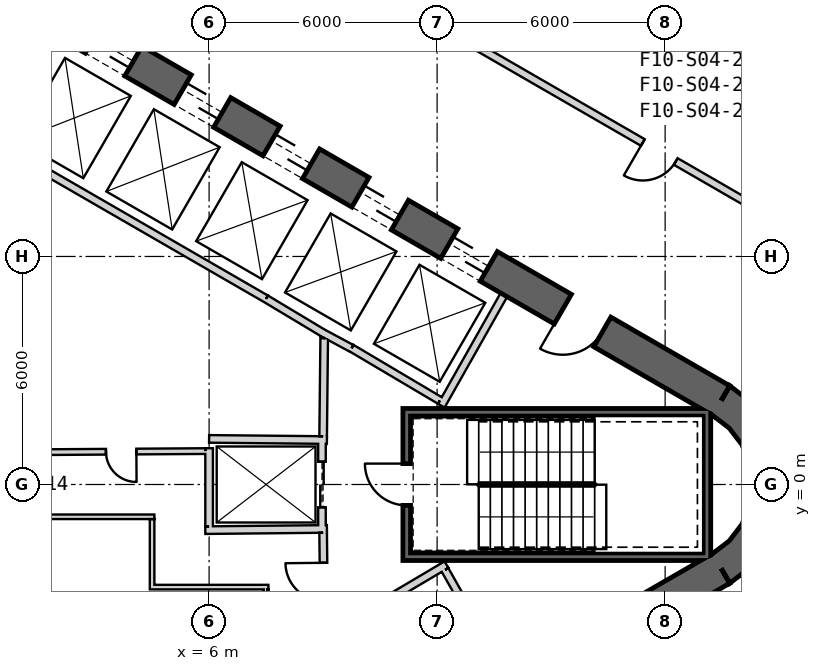
"""IFC4 building model, lengths in metres.
Left out: names, types, materials, properties, quantities, classifications, styles, units other than length and angle.
Written with IfcOpenShell. Run it as: python <this file> out.ifc"""

import sys

from ifc_helpers import new_model, si_unit, direction, frame, frame_2d, origin, place, context, subcontext, project, spatial, polyline, rectangle, outline, extrude, element, fill, save


model = new_model("IFC4")
c1 = context("Model", 3, precision=1e-05, world=origin(), true_north=direction((0.0, 1.0)))
c2 = subcontext(c1, "Body", "Model", "MODEL_VIEW")
j1 = project(units=[si_unit("LENGTHUNIT", "METRE"), si_unit("PLANEANGLEUNIT", "RADIAN")], contexts=[c1])
p1 = place(None, origin())
s1 = spatial("IfcSite", under=j1, at=p1, CompositionType="ELEMENT")
p2 = place(p1, origin())
s2 = spatial("IfcBuilding", under=s1, at=p2, CompositionType="ELEMENT")
p3 = place(p2, frame((0.0, 0.0, 94.7)))
s3 = spatial("IfcBuildingStorey", under=s2, at=p3, CompositionType="ELEMENT", Elevation=94.7)
p4 = place(p3, frame((19.475, 2.208, 0.0), z_axis=(0.0, 0.0, 1.0), x_axis=(-0.866028369851, 0.499994862586, 0.0)))
e1 = element("IfcWall", 1, at=p4, inside=s3, PredefinedType="SHEAR", context=c2, shape_type="SweptSolid", body=[
    extrude(rectangle(XDim=31.523, YDim=0.9, at=frame_2d((15.762, 0.0))), origin(), (0.0, 0.0, 1.0), 4.1),
])
p5 = place(p4, frame((7.062, 0.0, 0.0)))
e2 = element("IfcOpeningElement", 2, at=p5, cuts=e1, PredefinedType="OPENING", context=c2, shape_type="SweptSolid", body=[
    extrude(rectangle(XDim=1.2, YDim=2.4, at=frame_2d((0.6, 1.2))), frame((0.0, 0.46, 0.0), z_axis=(0.0, -1.0, 0.0), x_axis=(1.0, 0.0, 0.0)), (0.0, 0.0, 1.0), 0.92),
])
p6 = place(p4, frame((9.762, 0.0, 0.0)))
e3 = element("IfcOpeningElement", 3, at=p6, cuts=e1, PredefinedType="OPENING", context=c2, shape_type="SweptSolid", body=[
    extrude(rectangle(XDim=1.2, YDim=2.4, at=frame_2d((0.6, 1.2))), frame((0.0, 0.46, 0.0), z_axis=(0.0, -1.0, 0.0), x_axis=(1.0, 0.0, 0.0)), (0.0, 0.0, 1.0), 0.92),
])
p7 = place(p4, frame((12.462, 0.0, 0.0)))
e4 = element("IfcOpeningElement", 4, at=p7, cuts=e1, PredefinedType="OPENING", context=c2, shape_type="SweptSolid", body=[
    extrude(rectangle(XDim=1.2, YDim=2.4, at=frame_2d((0.6, 1.2))), frame((0.0, 0.46, 0.0), z_axis=(0.0, -1.0, 0.0), x_axis=(1.0, 0.0, 0.0)), (0.0, 0.0, 1.0), 0.92),
])
p8 = place(p4, frame((15.162, 0.0, 0.0)))
e5 = element("IfcOpeningElement", 5, at=p8, cuts=e1, PredefinedType="OPENING", context=c2, shape_type="SweptSolid", body=[
    extrude(rectangle(XDim=1.2, YDim=2.4, at=frame_2d((0.6, 1.2))), frame((0.0, 0.46, 0.0), z_axis=(0.0, -1.0, 0.0), x_axis=(1.0, 0.0, 0.0)), (0.0, 0.0, 1.0), 0.92),
])
p9 = place(p4, frame((17.862, 0.0, 0.0)))
e6 = element("IfcOpeningElement", 6, at=p9, cuts=e1, PredefinedType="OPENING", context=c2, shape_type="SweptSolid", body=[
    extrude(rectangle(XDim=1.2, YDim=2.4, at=frame_2d((0.6, 1.2))), frame((0.0, 0.46, 0.0), z_axis=(0.0, -1.0, 0.0), x_axis=(1.0, 0.0, 0.0)), (0.0, 0.0, 1.0), 0.92),
])
p10 = place(p4, frame((20.562, 0.0, 0.0)))
e7 = element("IfcOpeningElement", 7, at=p10, cuts=e1, PredefinedType="OPENING", context=c2, shape_type="SweptSolid", body=[
    extrude(rectangle(XDim=1.2, YDim=2.4, at=frame_2d((0.6, 1.2))), frame((0.0, 0.46, 0.0), z_axis=(0.0, -1.0, 0.0), x_axis=(1.0, 0.0, 0.0)), (0.0, 0.0, 1.0), 0.92),
])
p11 = place(p4, frame((23.262, 0.0, 0.0)))
e8 = element("IfcOpeningElement", 8, at=p11, cuts=e1, PredefinedType="OPENING", context=c2, shape_type="SweptSolid", body=[
    extrude(rectangle(XDim=1.2, YDim=2.4, at=frame_2d((0.6, 1.2))), frame((0.0, 0.46, 0.0), z_axis=(0.0, -1.0, 0.0), x_axis=(1.0, 0.0, 0.0)), (0.0, 0.0, 1.0), 0.92),
])
p12 = place(p4, frame((3.612, 0.0, 0.0)))
e9 = element("IfcOpeningElement", 9, at=p12, cuts=e1, PredefinedType="OPENING", context=c2, shape_type="SweptSolid", body=[
    extrude(rectangle(XDim=1.2, YDim=2.4, at=frame_2d((0.6, 1.2))), frame((0.0, 0.46, 0.0), z_axis=(0.0, -1.0, 0.0), x_axis=(1.0, 0.0, 0.0)), (0.0, 0.0, 1.0), 0.92),
])
p13 = place(p4, frame((26.712, 0.0, 0.0)))
e10 = element("IfcOpeningElement", 10, at=p13, cuts=e1, PredefinedType="OPENING", context=c2, shape_type="SweptSolid", body=[
    extrude(rectangle(XDim=1.2, YDim=2.4, at=frame_2d((0.6, 1.2))), frame((0.0, 0.46, 0.0), z_axis=(0.0, -1.0, 0.0), x_axis=(1.0, 0.0, 0.0)), (0.0, 0.0, 1.0), 0.92),
])
p14 = place(p3, frame((-7.825, -17.97, 0.0), z_axis=(0.0, 0.0, 1.0), x_axis=(0.866028369851, 0.499994862586, 0.0)))
e11 = element("IfcWall", 11, at=p14, inside=s3, PredefinedType="SHEAR", context=c2, shape_type="SweptSolid", body=[
    extrude(rectangle(XDim=31.523, YDim=0.9, at=frame_2d((15.762, 0.0))), origin(), (0.0, 0.0, 1.0), 4.1),
])
p15 = place(p14, frame((7.062, 0.0, 0.0)))
e12 = element("IfcOpeningElement", 12, at=p15, cuts=e11, PredefinedType="OPENING", context=c2, shape_type="SweptSolid", body=[
    extrude(rectangle(XDim=1.2, YDim=2.4, at=frame_2d((0.6, 1.2))), frame((0.0, 0.46, 0.0), z_axis=(0.0, -1.0, 0.0), x_axis=(1.0, 0.0, 0.0)), (0.0, 0.0, 1.0), 0.92),
])
p16 = place(p14, frame((9.762, 0.0, 0.0)))
e13 = element("IfcOpeningElement", 13, at=p16, cuts=e11, PredefinedType="OPENING", context=c2, shape_type="SweptSolid", body=[
    extrude(rectangle(XDim=1.2, YDim=2.4, at=frame_2d((0.6, 1.2))), frame((0.0, 0.46, 0.0), z_axis=(0.0, -1.0, 0.0), x_axis=(1.0, 0.0, 0.0)), (0.0, 0.0, 1.0), 0.92),
])
p17 = place(p14, frame((12.462, 0.0, 0.0)))
e14 = element("IfcOpeningElement", 14, at=p17, cuts=e11, PredefinedType="OPENING", context=c2, shape_type="SweptSolid", body=[
    extrude(rectangle(XDim=1.2, YDim=2.4, at=frame_2d((0.6, 1.2))), frame((0.0, 0.46, 0.0), z_axis=(0.0, -1.0, 0.0), x_axis=(1.0, 0.0, 0.0)), (0.0, 0.0, 1.0), 0.92),
])
p18 = place(p14, frame((15.162, 0.0, 0.0)))
e15 = element("IfcOpeningElement", 15, at=p18, cuts=e11, PredefinedType="OPENING", context=c2, shape_type="SweptSolid", body=[
    extrude(rectangle(XDim=1.2, YDim=2.4, at=frame_2d((0.6, 1.2))), frame((0.0, 0.46, 0.0), z_axis=(0.0, -1.0, 0.0), x_axis=(1.0, 0.0, 0.0)), (0.0, 0.0, 1.0), 0.92),
])
p19 = place(p14, frame((17.862, 0.0, 0.0)))
e16 = element("IfcOpeningElement", 16, at=p19, cuts=e11, PredefinedType="OPENING", context=c2, shape_type="SweptSolid", body=[
    extrude(rectangle(XDim=1.2, YDim=2.4, at=frame_2d((0.6, 1.2))), frame((0.0, 0.46, 0.0), z_axis=(0.0, -1.0, 0.0), x_axis=(1.0, 0.0, 0.0)), (0.0, 0.0, 1.0), 0.92),
])
p20 = place(p14, frame((20.562, 0.0, 0.0)))
e17 = element("IfcOpeningElement", 17, at=p20, cuts=e11, PredefinedType="OPENING", context=c2, shape_type="SweptSolid", body=[
    extrude(rectangle(XDim=1.2, YDim=2.4, at=frame_2d((0.6, 1.2))), frame((0.0, 0.46, 0.0), z_axis=(0.0, -1.0, 0.0), x_axis=(1.0, 0.0, 0.0)), (0.0, 0.0, 1.0), 0.92),
])
p21 = place(p14, frame((26.712, 0.0, 0.0)))
e18 = element("IfcOpeningElement", 18, at=p21, cuts=e11, PredefinedType="OPENING", context=c2, shape_type="SweptSolid", body=[
    extrude(rectangle(XDim=1.2, YDim=2.4, at=frame_2d((0.6, 1.2))), frame((0.0, 0.46, 0.0), z_axis=(0.0, -1.0, 0.0), x_axis=(1.0, 0.0, 0.0)), (0.0, 0.0, 1.0), 0.92),
])
p22 = place(p14, frame((3.612, 0.0, 0.0)))
e19 = element("IfcOpeningElement", 19, at=p22, cuts=e11, PredefinedType="OPENING", context=c2, shape_type="SweptSolid", body=[
    extrude(rectangle(XDim=1.2, YDim=2.4, at=frame_2d((0.6, 1.2))), frame((0.0, 0.46, 0.0), z_axis=(0.0, -1.0, 0.0), x_axis=(1.0, 0.0, 0.0)), (0.0, 0.0, 1.0), 0.92),
])
p23 = place(p3, origin())
e20 = element("IfcWall", 20, at=p23, inside=s3, PredefinedType="SHEAR", context=c2, shape_type="SweptSolid", body=[
    extrude(outline(polyline([(19.7, -2.598), (20.321, -2.121), (20.798, -1.5), (21.098, -0.777), (21.2, 0.0), (21.098, 0.777), (20.798, 1.5), (20.321, 2.121), (19.7, 2.598), (19.25, 1.819), (19.685, 1.485), (20.019, 1.05), (20.229, 0.543), (20.3, 0.0), (20.229, -0.543), (20.019, -1.05), (19.685, -1.485), (19.25, -1.819), (19.7, -2.598)])), origin(), (0.0, 0.0, 1.0), 4.1),
])
p24 = place(p3, frame((7.497, 4.886, 0.0), z_axis=(0.0, 0.0, 1.0), x_axis=(-0.866030989016, 0.499990325971, 0.0)))
e21 = element("IfcWall", 21, at=p24, inside=s3, PredefinedType="PLUMBINGWALL", context=c2, shape_type="SweptSolid", body=[
    extrude(rectangle(XDim=8.1, YDim=0.2, at=frame_2d((4.05, 0.0))), origin(), (0.0, 0.0, 1.0), 3.8),
])
p25 = place(p3, frame((12.11, 2.073, 0.0), z_axis=(0.0, 0.0, 1.0), x_axis=(0.49196600604, 0.870614408852, 0.0)))
e22 = element("IfcWall", 22, at=p25, inside=s3, PredefinedType="PLUMBINGWALL", context=c2, shape_type="SweptSolid", body=[
    extrude(rectangle(XDim=3.35, YDim=0.2, at=frame_2d((1.675, 0.0))), origin(), (0.0, 0.0, 1.0), 3.8),
])
p26 = place(p3, frame((12.073, 2.211, 0.0), z_axis=(0.0, 0.0, 1.0), x_axis=(-0.860438357912, 0.509554542943, 0.0)))
e23 = element("IfcWall", 23, at=p26, inside=s3, PredefinedType="PLUMBINGWALL", context=c2, shape_type="SweptSolid", body=[
    extrude(rectangle(XDim=2.7, YDim=0.2, at=frame_2d((1.35, 0.0))), origin(), (0.0, 0.0, 1.0), 3.8),
])
p27 = place(p3, frame((9.748, 3.583, 0.0), z_axis=(0.0, 0.0, 1.0), x_axis=(-0.880917147855, 0.473270513147, 0.0)))
e24 = element("IfcWall", 24, at=p27, inside=s3, PredefinedType="PLUMBINGWALL", context=c2, shape_type="SweptSolid", body=[
    extrude(rectangle(XDim=0.878, YDim=0.2, at=frame_2d((0.439, 0.0))), origin(), (0.0, 0.0, 1.0), 3.8),
])
p28 = place(p3, frame((9.079, 3.937, 0.0), z_axis=(0.0, 0.0, 1.0), x_axis=(-0.857516281273, 0.51445682749, 0.0)))
e25 = element("IfcWall", 25, at=p28, inside=s3, PredefinedType="PLUMBINGWALL", context=c2, shape_type="SweptSolid", body=[
    extrude(rectangle(XDim=1.845, YDim=0.2, at=frame_2d((0.922, 0.0))), origin(), (0.0, 0.0, 1.0), 3.8),
])
p29 = place(p3, frame((19.2, 1.9, -0.3), z_axis=(0.0, 0.0, 1.0), x_axis=(-1.0, 0.0, 0.0)))
e26 = element("IfcWall", 26, at=p29, inside=s3, PredefinedType="SHEAR", context=c2, shape_type="SweptSolid", body=[
    extrude(rectangle(XDim=8.1, YDim=0.2, at=frame_2d((4.05, 0.0))), origin(), (0.0, 0.0, 1.0), 4.1),
])
p30 = place(p3, frame((19.1, -2.0, -0.3), z_axis=(0.0, 0.0, 1.0), x_axis=(0.0, 1.0, 0.0)))
e27 = element("IfcWall", 27, at=p30, inside=s3, PredefinedType="SHEAR", context=c2, shape_type="SweptSolid", body=[
    extrude(rectangle(XDim=3.8, YDim=0.2, at=frame_2d((1.9, 0.0))), origin(), (0.0, 0.0, 1.0), 4.1),
])
p31 = place(p3, frame((11.1, -1.9, -0.3), z_axis=(0.0, 0.0, 1.0), x_axis=(1.0, 0.0, 0.0)))
e28 = element("IfcWall", 28, at=p31, inside=s3, PredefinedType="SHEAR", context=c2, shape_type="SweptSolid", body=[
    extrude(rectangle(XDim=7.9, YDim=0.2, at=frame_2d((3.95, 0.0))), origin(), (0.0, 0.0, 1.0), 4.1),
])
p32 = place(p3, frame((11.2, -1.8, -0.3), z_axis=(0.0, 0.0, 1.0), x_axis=(0.0, 1.0, 0.0)))
e29 = element("IfcWall", 29, at=p32, inside=s3, PredefinedType="SHEAR", context=c2, shape_type="SweptSolid", body=[
    extrude(rectangle(XDim=3.6, YDim=0.2, at=frame_2d((1.8, 0.0))), origin(), (0.0, 0.0, 1.0), 4.1),
])
p33 = place(p32, frame((1.25, 0.0, 0.3)))
e30 = element("IfcOpeningElement", 30, at=p33, cuts=e29, PredefinedType="OPENING", context=c2, shape_type="SweptSolid", body=[
    extrude(rectangle(XDim=1.1, YDim=2.1, at=frame_2d((0.55, 1.05))), frame((0.0, 0.11, 0.0), z_axis=(0.0, -1.0, 0.0), x_axis=(1.0, 0.0, 0.0)), (0.0, 0.0, 1.0), 0.22),
])
p34 = place(p3, frame((8.97, 1.2, 0.0), z_axis=(0.0, 0.0, 1.0), x_axis=(0.0, -1.0, 0.0)))
e31 = element("IfcWall", 31, at=p34, inside=s3, PredefinedType="PLUMBINGWALL", context=c2, shape_type="SweptSolid", body=[
    extrude(rectangle(XDim=2.4, YDim=0.2, at=frame_2d((1.2, 0.0))), origin(), (0.0, 0.0, 1.0), 3.8),
])
p35 = place(p34, frame((0.6, 0.0, 0.0)))
e32 = element("IfcOpeningElement", 32, at=p35, cuts=e31, PredefinedType="OPENING", context=c2, shape_type="SweptSolid", body=[
    extrude(rectangle(XDim=1.2, YDim=2.4, at=frame_2d((0.6, 1.2))), frame((0.0, 0.11, 0.0), z_axis=(0.0, -1.0, 0.0), x_axis=(1.0, 0.0, 0.0)), (0.0, 0.0, 1.0), 0.22),
])
p36 = place(p3, frame((6.0, 1.2, 0.0), z_axis=(0.0, 0.0, 1.0), x_axis=(0.999949988, -0.010001074852, 0.0)))
e33 = element("IfcWall", 33, at=p36, inside=s3, PredefinedType="PLUMBINGWALL", context=c2, shape_type="SweptSolid", body=[
    extrude(rectangle(XDim=3.1, YDim=0.2, at=frame_2d((1.55, 0.0))), origin(), (0.0, 0.0, 1.0), 3.8),
])
p37 = place(p3, frame((5.9, -1.201, 0.0), z_axis=(0.0, 0.0, 1.0), x_axis=(0.999950064753, 0.009993397809, 0.0)))
e34 = element("IfcWall", 34, at=p37, inside=s3, PredefinedType="PLUMBINGWALL", context=c2, shape_type="SweptSolid", body=[
    extrude(rectangle(XDim=3.2, YDim=0.2, at=frame_2d((1.6, 0.0))), origin(), (0.0, 0.0, 1.0), 3.8),
])
p38 = place(p3, frame((6.0, -1.1, 0.0), z_axis=(0.0, 0.0, 1.0), x_axis=(0.0, 1.0, 0.0)))
e35 = element("IfcWall", 35, at=p38, inside=s3, PredefinedType="PLUMBINGWALL", context=c2, shape_type="SweptSolid", body=[
    extrude(rectangle(XDim=2.055, YDim=0.2, at=frame_2d((1.027, 0.0))), origin(), (0.0, 0.0, 1.0), 3.8),
])
p39 = place(p3, frame((12.245, -2.109, 0.0), z_axis=(0.0, 0.0, 1.0), x_axis=(-0.860414880418, -0.509594185166, 0.0)))
e36 = element("IfcWall", 36, at=p39, inside=s3, PredefinedType="PARTITIONING", context=c2, shape_type="SweptSolid", body=[
    extrude(rectangle(XDim=2.7, YDim=0.2, at=frame_2d((1.35, 0.0))), origin(), (0.0, 0.0, 1.0), 3.8),
])
p40 = place(p3, frame((13.758, -4.99, 0.0), z_axis=(0.0, 0.0, 1.0), x_axis=(-0.491993409184, 0.87059892334, 0.0)))
e37 = element("IfcWall", 37, at=p40, inside=s3, PredefinedType="PARTITIONING", context=c2, shape_type="SweptSolid", body=[
    extrude(rectangle(XDim=3.15, YDim=0.2, at=frame_2d((1.575, 0.0))), origin(), (0.0, 0.0, 1.0), 3.8),
])
p41 = place(p40, frame((1.175, 0.0, 0.0)))
e38 = element("IfcOpeningElement", 38, at=p41, cuts=e37, PredefinedType="OPENING", context=c2, shape_type="SweptSolid", body=[
    extrude(rectangle(XDim=0.8, YDim=2.1, at=frame_2d((0.4, 1.05))), frame((0.0, 0.11, 0.0), z_axis=(0.0, -1.0, 0.0), x_axis=(1.0, 0.0, 0.0)), (0.0, 0.0, 1.0), 0.22),
])
p42 = place(p3, frame((9.001, 1.27, 0.0), z_axis=(0.0, 0.0, 1.0), x_axis=(0.010784614026, 0.999941844359, 0.0)))
e39 = element("IfcWall", 39, at=p42, inside=s3, PredefinedType="PARTITIONING", context=c2, shape_type="SweptSolid", body=[
    extrude(rectangle(XDim=2.581, YDim=0.2, at=frame_2d((1.291, 0.0))), origin(), (0.0, 0.0, 1.0), 3.8),
])
p43 = place(p3, frame((9.029, -3.851, 0.0), z_axis=(0.0, 0.0, 1.0), x_axis=(-0.010783593937, 0.99994185536, 0.0)))
e40 = element("IfcWall", 40, at=p43, inside=s3, PredefinedType="PARTITIONING", context=c2, shape_type="SweptSolid", body=[
    extrude(rectangle(XDim=2.581, YDim=0.2, at=frame_2d((1.291, 0.0))), origin(), (0.0, 0.0, 1.0), 3.8),
])
p44 = place(p43, frame((0.791, 0.0, 0.0)))
e41 = element("IfcOpeningElement", 41, at=p44, cuts=e40, PredefinedType="OPENING", context=c2, shape_type="SweptSolid", body=[
    extrude(rectangle(XDim=1.0, YDim=2.1, at=frame_2d((0.5, 1.05))), frame((0.0, 0.11, 0.0), z_axis=(0.0, -1.0, 0.0), x_axis=(1.0, 0.0, 0.0)), (0.0, 0.0, 1.0), 0.22),
])
p45 = place(p3, frame((1.344, 0.849, 0.0), z_axis=(0.0, 0.0, 1.0), x_axis=(0.999978627641, 0.00653790957, 0.0)))
e42 = element("IfcWall", 42, at=p45, inside=s3, PredefinedType="PLUMBINGWALL", context=c2, shape_type="SweptSolid", body=[
    extrude(rectangle(XDim=4.556, YDim=0.15, at=frame_2d((2.278, 0.0))), origin(), (0.0, 0.0, 1.0), 3.8),
])
p46 = place(p45, frame((1.942, 0.0, 0.0)))
e43 = element("IfcOpeningElement", 43, at=p46, cuts=e42, PredefinedType="OPENING", context=c2, shape_type="SweptSolid", body=[
    extrude(rectangle(XDim=0.8, YDim=2.1, at=frame_2d((0.4, 1.05))), frame((0.0, 0.085, 0.0), z_axis=(0.0, -1.0, 0.0), x_axis=(1.0, 0.0, 0.0)), (0.0, 0.0, 1.0), 0.17),
])
p47 = place(p3, frame((4.56, -0.85, 0.0), z_axis=(0.0, 0.0, 1.0), x_axis=(-1.0, 0.0, 0.0)))
e44 = element("IfcWall", 44, at=p47, inside=s3, PredefinedType="PARTITIONING", context=c2, shape_type="SweptSolid", body=[
    extrude(rectangle(XDim=3.069, YDim=0.12, at=frame_2d((1.535, 0.0))), origin(), (0.0, 0.0, 1.0), 3.8),
])
p48 = place(p3, frame((4.5, -2.76, 0.0), z_axis=(0.0, 0.0, 1.0), x_axis=(0.0, 1.0, 0.0)))
e45 = element("IfcWall", 45, at=p48, inside=s3, PredefinedType="PARTITIONING", context=c2, shape_type="SweptSolid", body=[
    extrude(rectangle(XDim=1.85, YDim=0.12, at=frame_2d((0.925, 0.0))), origin(), (0.0, 0.0, 1.0), 3.8),
])
p49 = place(p3, frame((7.56, -2.7, 0.0), z_axis=(0.0, 0.0, 1.0), x_axis=(-1.0, 0.0, 0.0)))
e46 = element("IfcWall", 46, at=p49, inside=s3, PredefinedType="PARTITIONING", context=c2, shape_type="SweptSolid", body=[
    extrude(rectangle(XDim=3.0, YDim=0.12, at=frame_2d((1.5, 0.0))), origin(), (0.0, 0.0, 1.0), 3.8),
])
p50 = place(p3, frame((7.475, -4.865, 0.0), z_axis=(0.0, 0.0, 1.0), x_axis=(0.011716133148, 0.999931363757, 0.0)))
e47 = element("IfcWall", 47, at=p50, inside=s3, PredefinedType="PARTITIONING", context=c2, shape_type="SweptSolid", body=[
    extrude(rectangle(XDim=2.105, YDim=0.12, at=frame_2d((1.052, 0.0))), origin(), (0.0, 0.0, 1.0), 3.8),
])
p51 = place(p3, frame((22.727, 5.931, 0.0), z_axis=(0.0, 0.0, 1.0), x_axis=(-0.866021821949, 0.50000620387, 0.0)))
e48 = element("IfcWall", 48, at=p51, inside=s3, PredefinedType="PARTITIONING", context=c2, shape_type="SweptSolid", body=[
    extrude(rectangle(XDim=11.197, YDim=0.2, at=frame_2d((5.598, 0.0))), origin(), (0.0, 0.0, 1.0), 2.98),
])
p52 = place(p51, frame((5.136, 0.0, 0.0)))
e49 = element("IfcOpeningElement", 49, at=p52, cuts=e48, PredefinedType="OPENING", context=c2, shape_type="SweptSolid", body=[
    extrude(rectangle(XDim=1.0, YDim=2.1, at=frame_2d((0.5, 1.05))), frame((0.0, 0.11, 0.0), z_axis=(0.0, -1.0, 0.0), x_axis=(1.0, 0.0, 0.0)), (0.0, 0.0, 1.0), 0.22),
])
p53 = place(p33, origin())
e50 = element("IfcDoor", 50, at=p53, inside=s3, OperationType="SINGLE_SWING_RIGHT", PredefinedType="USERDEFINED", context=c2, shape_type="SweptSolid", body=[
    extrude(rectangle(XDim=1.1, YDim=2.1, at=frame_2d((0.55, 1.05))), frame((0.0, 0.025, 0.0), z_axis=(0.0, -1.0, 0.0), x_axis=(1.0, 0.0, 0.0)), (0.0, 0.0, 1.0), 0.05),
])
fill(e30, e50)
p54 = place(p44, origin())
e51 = element("IfcDoor", 51, at=p54, inside=s3, OperationType="SINGLE_SWING_RIGHT", PredefinedType="USERDEFINED", context=c2, shape_type="SweptSolid", body=[
    extrude(rectangle(XDim=1.0, YDim=2.1, at=frame_2d((0.5, 1.05))), frame((0.0, 0.025, 0.0), z_axis=(0.0, -1.0, 0.0), x_axis=(1.0, 0.0, 0.0)), (0.0, 0.0, 1.0), 0.05),
])
fill(e41, e51)
p55 = place(p35, origin())
e52 = element("IfcDoor", 52, at=p55, inside=s3, OperationType="SLIDING_TO_LEFT", PredefinedType="USERDEFINED", context=c2, shape_type="SweptSolid", body=[
    extrude(rectangle(XDim=1.2, YDim=2.4, at=frame_2d((0.6, 1.2))), frame((0.0, 0.025, 0.0), z_axis=(0.0, -1.0, 0.0), x_axis=(1.0, 0.0, 0.0)), (0.0, 0.0, 1.0), 0.05),
])
fill(e32, e52)
p56 = place(p46, origin())
e53 = element("IfcDoor", 53, at=p56, inside=s3, OperationType="SINGLE_SWING_LEFT", PredefinedType="USERDEFINED", context=c2, shape_type="SweptSolid", body=[
    extrude(rectangle(XDim=0.8, YDim=2.1, at=frame_2d((0.4, 1.05))), frame((0.0, 0.025, 0.0), z_axis=(0.0, -1.0, 0.0), x_axis=(1.0, 0.0, 0.0)), (0.0, 0.0, 1.0), 0.05),
])
fill(e43, e53)
p57 = place(p52, origin())
e54 = element("IfcDoor", 54, at=p57, inside=s3, OperationType="SINGLE_SWING_RIGHT", PredefinedType="USERDEFINED", context=c2, shape_type="SweptSolid", body=[
    extrude(rectangle(XDim=1.0, YDim=2.1, at=frame_2d((0.5, 1.05))), frame((0.0, 0.025, 0.0), z_axis=(0.0, -1.0, 0.0), x_axis=(1.0, 0.0, 0.0)), (0.0, 0.0, 1.0), 0.05),
])
fill(e49, e54)
p58 = place(p5, origin())
e55 = element("IfcDoor", 55, at=p58, inside=s3, OperationType="SLIDING_TO_LEFT", PredefinedType="USERDEFINED", context=c2, shape_type="SweptSolid", body=[
    extrude(rectangle(XDim=1.2, YDim=2.4, at=frame_2d((0.6, 1.2))), frame((0.0, 0.025, 0.0), z_axis=(0.0, -1.0, 0.0), x_axis=(1.0, 0.0, 0.0)), (0.0, 0.0, 1.0), 0.05),
])
fill(e2, e55)
p59 = place(p6, origin())
e56 = element("IfcDoor", 56, at=p59, inside=s3, OperationType="SLIDING_TO_LEFT", PredefinedType="USERDEFINED", context=c2, shape_type="SweptSolid", body=[
    extrude(rectangle(XDim=1.2, YDim=2.4, at=frame_2d((0.6, 1.2))), frame((0.0, 0.025, 0.0), z_axis=(0.0, -1.0, 0.0), x_axis=(1.0, 0.0, 0.0)), (0.0, 0.0, 1.0), 0.05),
])
fill(e3, e56)
p60 = place(p7, origin())
e57 = element("IfcDoor", 57, at=p60, inside=s3, OperationType="SLIDING_TO_LEFT", PredefinedType="USERDEFINED", context=c2, shape_type="SweptSolid", body=[
    extrude(rectangle(XDim=1.2, YDim=2.4, at=frame_2d((0.6, 1.2))), frame((0.0, 0.025, 0.0), z_axis=(0.0, -1.0, 0.0), x_axis=(1.0, 0.0, 0.0)), (0.0, 0.0, 1.0), 0.05),
])
fill(e4, e57)
p61 = place(p8, origin())
e58 = element("IfcDoor", 58, at=p61, inside=s3, OperationType="SLIDING_TO_LEFT", PredefinedType="USERDEFINED", context=c2, shape_type="SweptSolid", body=[
    extrude(rectangle(XDim=1.2, YDim=2.4, at=frame_2d((0.6, 1.2))), frame((0.0, 0.025, 0.0), z_axis=(0.0, -1.0, 0.0), x_axis=(1.0, 0.0, 0.0)), (0.0, 0.0, 1.0), 0.05),
])
fill(e5, e58)
p62 = place(p9, origin())
e59 = element("IfcDoor", 59, at=p62, inside=s3, OperationType="SLIDING_TO_LEFT", PredefinedType="USERDEFINED", context=c2, shape_type="SweptSolid", body=[
    extrude(rectangle(XDim=1.2, YDim=2.4, at=frame_2d((0.6, 1.2))), frame((0.0, 0.025, 0.0), z_axis=(0.0, -1.0, 0.0), x_axis=(1.0, 0.0, 0.0)), (0.0, 0.0, 1.0), 0.05),
])
fill(e6, e59)
p63 = place(p12, origin())
e60 = element("IfcDoor", 60, at=p63, inside=s3, OperationType="SINGLE_SWING_LEFT", PredefinedType="USERDEFINED", context=c2, shape_type="SweptSolid", body=[
    extrude(rectangle(XDim=1.2, YDim=2.4, at=frame_2d((0.6, 1.2))), frame((0.0, 0.025, 0.0), z_axis=(0.0, -1.0, 0.0), x_axis=(1.0, 0.0, 0.0)), (0.0, 0.0, 1.0), 0.05),
])
fill(e9, e60)
save(model, sys.argv[1])
